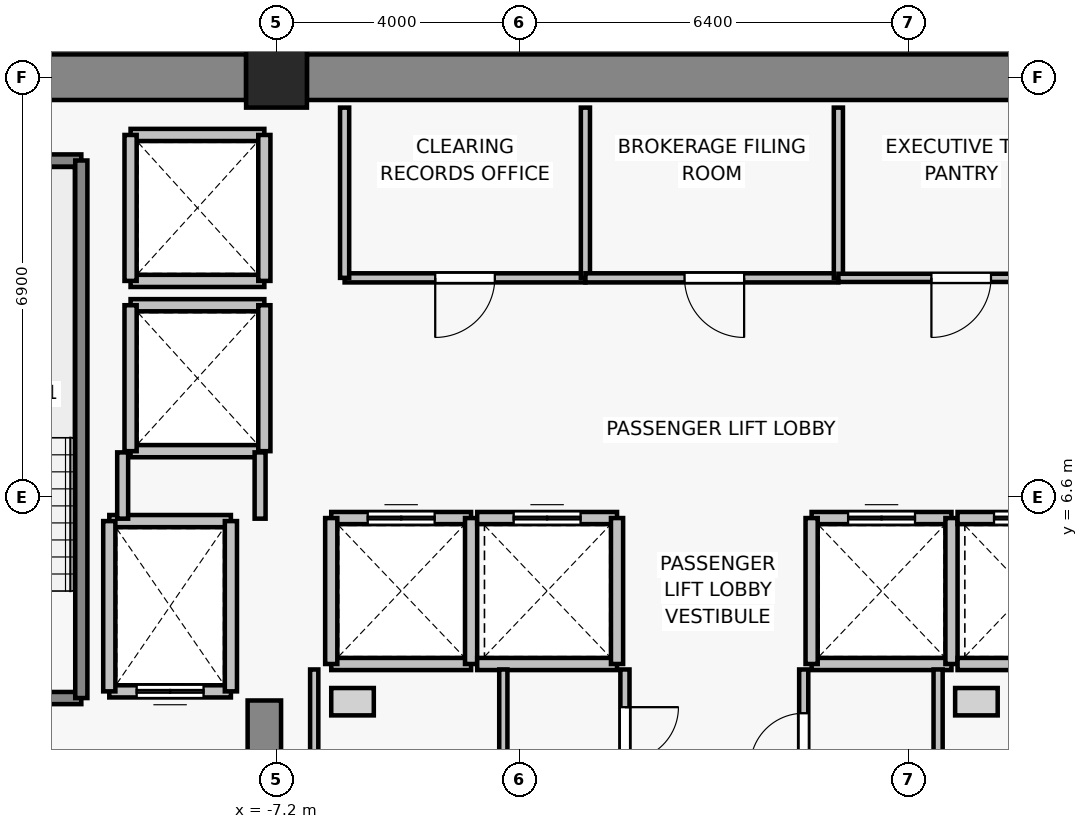
"""IFC4 building model, lengths in metres.
Left out: names, types, materials, properties, quantities, classifications, styles, units other than length and angle.
Written with IfcOpenShell. Run it as: python <this file> out.ifc"""

import sys

from ifc_helpers import new_model, si_unit, direction, frame, frame_2d, origin, origin_2d, place, context, subcontext, project, spatial, rectangle, extrude, source, transform, mapped, element, fill, save


model = new_model("IFC4")
c1 = context("Model", 3, precision=1e-05, world=origin(), true_north=direction((0.0, 1.0)))
c2 = subcontext(c1, "Body", "Model", "MODEL_VIEW")
j1 = project(units=[si_unit("LENGTHUNIT", "METRE"), si_unit("PLANEANGLEUNIT", "RADIAN")], contexts=[c1])
p1 = place(None, origin())
s1 = spatial("IfcSite", under=j1, at=p1, CompositionType="ELEMENT")
p2 = place(p1, origin())
s2 = spatial("IfcBuilding", under=s1, at=p2, CompositionType="ELEMENT")
p3 = place(p2, frame((0.0, 0.0, 195.7)))
s3 = spatial("IfcBuildingStorey", under=s2, at=p3, CompositionType="ELEMENT", Elevation=195.7)
p4 = place(p3, frame((-7.2, 13.5, 0.0), z_axis=(0.0, 0.0, 1.0), x_axis=(1.0, 0.0, 0.0)))
e1 = element("IfcColumn", 1, at=p4, inside=s3, PredefinedType="COLUMN", context=c2, shape_type="SweptSolid", body=[
    extrude(rectangle(XDim=1.0, YDim=1.0, at=origin_2d()), origin(), (0.0, 0.0, 1.0), 3.3),
])
p5 = place(p3, frame((-13.9, 13.5, 0.0), z_axis=(0.0, 0.0, 1.0), x_axis=(1.0, 0.0, 0.0)))
e2 = element("IfcWall", 2, at=p5, inside=s3, PredefinedType="SHEAR", context=c2, shape_type="SweptSolid", body=[
    extrude(rectangle(XDim=6.2, YDim=0.75, at=frame_2d((3.1, 0.0))), origin(), (0.0, 0.0, 1.0), 3.05),
])
p6 = place(p3, frame((-6.7, 13.5, 0.0), z_axis=(0.0, 0.0, 1.0), x_axis=(1.0, 0.0, 0.0)))
e3 = element("IfcWall", 3, at=p6, inside=s3, PredefinedType="SHEAR", context=c2, shape_type="SweptSolid", body=[
    extrude(rectangle(XDim=13.4, YDim=0.75, at=frame_2d((6.7, 0.0))), origin(), (0.0, 0.0, 1.0), 3.05),
])
p7 = place(p3, frame((-7.4, -0.825, 0.0), z_axis=(0.0, 0.0, 1.0), x_axis=(0.0, 1.0, 0.0)))
e4 = element("IfcWall", 4, at=p7, inside=s3, PredefinedType="SHEAR", context=c2, shape_type="SweptSolid", body=[
    extrude(rectangle(XDim=4.075, YDim=0.55, at=frame_2d((2.038, 0.0))), origin(), (0.0, 0.0, 1.0), 3.05),
])
p8 = place(p3, frame((-7.95, 3.4, 0.0), z_axis=(0.0, 0.0, 1.0), x_axis=(-1.0, 0.0, 0.0)))
e5 = element("IfcWall", 5, at=p8, inside=s3, PredefinedType="SOLIDWALL", context=c2, shape_type="SweptSolid", body=[
    extrude(rectangle(XDim=2.0, YDim=0.2, at=frame_2d((1.0, 0.0))), origin(), (0.0, 0.0, 1.0), 3.05),
])
p9 = place(p8, frame((0.45, 0.0, 0.0)))
e6 = element("IfcOpeningElement", 6, at=p9, cuts=e5, PredefinedType="OPENING", context=c2, shape_type="SweptSolid", body=[
    extrude(rectangle(XDim=1.1, YDim=2.2, at=frame_2d((0.55, 1.1))), frame((0.0, 0.11, 0.0), z_axis=(0.0, -1.0, 0.0), x_axis=(1.0, 0.0, 0.0)), (0.0, 0.0, 1.0), 0.22),
])
p10 = place(p3, frame((-9.95, 6.2, 0.0), z_axis=(0.0, 0.0, 1.0), x_axis=(1.0, 0.0, 0.0)))
e7 = element("IfcWall", 7, at=p10, inside=s3, PredefinedType="SOLIDWALL", context=c2, shape_type="SweptSolid", body=[
    extrude(rectangle(XDim=2.0, YDim=0.2, at=frame_2d((1.0, 0.0))), origin(), (0.0, 0.0, 1.0), 3.05),
])
for number, where, z_axis, x_axis in (
    (8, (-9.95, 3.4, 0.0), (0.0, 0.0, 1.0), (0.0, 1.0, 0.0)),
    (9, (-7.95, 6.2, 0.0), (0.0, 0.0, 1.0), (0.0, -1.0, 0.0)),
):
    element("IfcWall", number, at=place(p3, frame(where, z_axis=z_axis, x_axis=x_axis)), inside=s3, PredefinedType="SOLIDWALL", context=c2, shape_type="SweptSolid", body=[
        extrude(rectangle(XDim=2.8, YDim=0.2, at=frame_2d((1.4, 0.0))), origin(), (0.0, 0.0, 1.0), 3.05),
    ])
p11 = place(p3, frame((-4.0, 3.85, 0.0), z_axis=(0.0, 0.0, 1.0), x_axis=(-1.0, 0.0, 0.0)))
e10 = element("IfcWall", 10, at=p11, inside=s3, PredefinedType="SOLIDWALL", context=c2, shape_type="SweptSolid", body=[
    extrude(rectangle(XDim=2.3, YDim=0.2, at=frame_2d((1.15, 0.0))), origin(), (0.0, 0.0, 1.0), 3.05),
])
p12 = place(p3, frame((-6.3, 6.25, 0.0), z_axis=(0.0, 0.0, 1.0), x_axis=(1.0, 0.0, 0.0)))
e11 = element("IfcWall", 11, at=p12, inside=s3, PredefinedType="SOLIDWALL", context=c2, shape_type="SweptSolid", body=[
    extrude(rectangle(XDim=2.3, YDim=0.2, at=frame_2d((1.15, 0.0))), origin(), (0.0, 0.0, 1.0), 3.05),
])
p13 = place(p12, frame((0.6, 0.0, 0.0)))
e12 = element("IfcOpeningElement", 12, at=p13, cuts=e11, PredefinedType="OPENING", context=c2, shape_type="SweptSolid", body=[
    extrude(rectangle(XDim=1.1, YDim=2.2, at=frame_2d((0.55, 1.1))), frame((0.0, 0.11, 0.0), z_axis=(0.0, -1.0, 0.0), x_axis=(1.0, 0.0, 0.0)), (0.0, 0.0, 1.0), 0.22),
])
for number, where, z_axis, x_axis in (
    (13, (-6.3, 3.85, 0.0), (0.0, 0.0, 1.0), (0.0, 1.0, 0.0)),
    (14, (-4.0, 6.25, 0.0), (0.0, 0.0, 1.0), (0.0, -1.0, 0.0)),
):
    element("IfcWall", number, at=place(p3, frame(where, z_axis=z_axis, x_axis=x_axis)), inside=s3, PredefinedType="SOLIDWALL", context=c2, shape_type="SweptSolid", body=[
        extrude(rectangle(XDim=2.4, YDim=0.2, at=frame_2d((1.2, 0.0))), origin(), (0.0, 0.0, 1.0), 3.05),
    ])
p14 = place(p3, frame((-1.6, 3.85, 0.0), z_axis=(0.0, 0.0, 1.0), x_axis=(-1.0, 0.0, 0.0)))
e15 = element("IfcWall", 15, at=p14, inside=s3, PredefinedType="SOLIDWALL", context=c2, shape_type="SweptSolid", body=[
    extrude(rectangle(XDim=2.3, YDim=0.2, at=frame_2d((1.15, 0.0))), origin(), (0.0, 0.0, 1.0), 3.05),
])
p15 = place(p3, frame((-3.9, 6.25, 0.0), z_axis=(0.0, 0.0, 1.0), x_axis=(1.0, 0.0, 0.0)))
e16 = element("IfcWall", 16, at=p15, inside=s3, PredefinedType="SOLIDWALL", context=c2, shape_type="SweptSolid", body=[
    extrude(rectangle(XDim=2.3, YDim=0.2, at=frame_2d((1.15, 0.0))), origin(), (0.0, 0.0, 1.0), 3.05),
])
p16 = place(p15, frame((0.6, 0.0, 0.0)))
e17 = element("IfcOpeningElement", 17, at=p16, cuts=e16, PredefinedType="OPENING", context=c2, shape_type="SweptSolid", body=[
    extrude(rectangle(XDim=1.1, YDim=2.2, at=frame_2d((0.55, 1.1))), frame((0.0, 0.11, 0.0), z_axis=(0.0, -1.0, 0.0), x_axis=(1.0, 0.0, 0.0)), (0.0, 0.0, 1.0), 0.22),
])
p17 = place(p3, frame((-1.6, 6.25, 0.0), z_axis=(0.0, 0.0, 1.0), x_axis=(0.0, -1.0, 0.0)))
e18 = element("IfcWall", 18, at=p17, inside=s3, PredefinedType="SOLIDWALL", context=c2, shape_type="SweptSolid", body=[
    extrude(rectangle(XDim=2.4, YDim=0.2, at=frame_2d((1.2, 0.0))), origin(), (0.0, 0.0, 1.0), 3.05),
])
p18 = place(p3, frame((3.9, 3.85, 0.0), z_axis=(0.0, 0.0, 1.0), x_axis=(-1.0, 0.0, 0.0)))
e19 = element("IfcWall", 19, at=p18, inside=s3, PredefinedType="SOLIDWALL", context=c2, shape_type="SweptSolid", body=[
    extrude(rectangle(XDim=2.3, YDim=0.2, at=frame_2d((1.15, 0.0))), origin(), (0.0, 0.0, 1.0), 3.05),
])
p19 = place(p3, frame((1.6, 6.25, 0.0), z_axis=(0.0, 0.0, 1.0), x_axis=(1.0, 0.0, 0.0)))
e20 = element("IfcWall", 20, at=p19, inside=s3, PredefinedType="SOLIDWALL", context=c2, shape_type="SweptSolid", body=[
    extrude(rectangle(XDim=2.3, YDim=0.2, at=frame_2d((1.15, 0.0))), origin(), (0.0, 0.0, 1.0), 3.05),
])
p20 = place(p19, frame((0.6, 0.0, 0.0)))
e21 = element("IfcOpeningElement", 21, at=p20, cuts=e20, PredefinedType="OPENING", context=c2, shape_type="SweptSolid", body=[
    extrude(rectangle(XDim=1.1, YDim=2.2, at=frame_2d((0.55, 1.1))), frame((0.0, 0.11, 0.0), z_axis=(0.0, -1.0, 0.0), x_axis=(1.0, 0.0, 0.0)), (0.0, 0.0, 1.0), 0.22),
])
for number, where, z_axis, x_axis in (
    (22, (1.6, 3.85, 0.0), (0.0, 0.0, 1.0), (0.0, 1.0, 0.0)),
    (23, (3.9, 6.25, 0.0), (0.0, 0.0, 1.0), (0.0, -1.0, 0.0)),
):
    element("IfcWall", number, at=place(p3, frame(where, z_axis=z_axis, x_axis=x_axis)), inside=s3, PredefinedType="SOLIDWALL", context=c2, shape_type="SweptSolid", body=[
        extrude(rectangle(XDim=2.4, YDim=0.2, at=frame_2d((1.2, 0.0))), origin(), (0.0, 0.0, 1.0), 3.05),
    ])
p21 = place(p3, frame((6.3, 3.85, 0.0), z_axis=(0.0, 0.0, 1.0), x_axis=(-1.0, 0.0, 0.0)))
e24 = element("IfcWall", 24, at=p21, inside=s3, PredefinedType="SOLIDWALL", context=c2, shape_type="SweptSolid", body=[
    extrude(rectangle(XDim=2.3, YDim=0.2, at=frame_2d((1.15, 0.0))), origin(), (0.0, 0.0, 1.0), 3.05),
])
p22 = place(p3, frame((4.0, 6.25, 0.0), z_axis=(0.0, 0.0, 1.0), x_axis=(1.0, 0.0, 0.0)))
e25 = element("IfcWall", 25, at=p22, inside=s3, PredefinedType="SOLIDWALL", context=c2, shape_type="SweptSolid", body=[
    extrude(rectangle(XDim=2.3, YDim=0.2, at=frame_2d((1.15, 0.0))), origin(), (0.0, 0.0, 1.0), 3.05),
])
p23 = place(p22, frame((0.6, 0.0, 0.0)))
e26 = element("IfcOpeningElement", 26, at=p23, cuts=e25, PredefinedType="OPENING", context=c2, shape_type="SweptSolid", body=[
    extrude(rectangle(XDim=1.1, YDim=2.2, at=frame_2d((0.55, 1.1))), frame((0.0, 0.11, 0.0), z_axis=(0.0, -1.0, 0.0), x_axis=(1.0, 0.0, 0.0)), (0.0, 0.0, 1.0), 0.22),
])
for number, where, z_axis, x_axis in (
    (27, (-7.4, 7.35, 0.0), (0.0, 0.0, 1.0), (-1.0, 0.0, 0.0)),
    (28, (-9.6, 9.75, 0.0), (0.0, 0.0, 1.0), (1.0, 0.0, 0.0)),
):
    element("IfcWall", number, at=place(p3, frame(where, z_axis=z_axis, x_axis=x_axis)), inside=s3, PredefinedType="SOLIDWALL", context=c2, shape_type="SweptSolid", body=[
        extrude(rectangle(XDim=2.2, YDim=0.2, at=frame_2d((1.1, 0.0))), origin(), (0.0, 0.0, 1.0), 2.54),
    ])
p24 = place(p3, frame((-9.6, 7.35, 0.0), z_axis=(0.0, 0.0, 1.0), x_axis=(0.0, 1.0, 0.0)))
e29 = element("IfcWall", 29, at=p24, inside=s3, PredefinedType="SOLIDWALL", context=c2, shape_type="SweptSolid", body=[
    extrude(rectangle(XDim=2.4, YDim=0.2, at=frame_2d((1.2, 0.0))), origin(), (0.0, 0.0, 1.0), 3.05),
])
p25 = place(p3, frame((-7.4, 9.75, 0.0), z_axis=(0.0, 0.0, 1.0), x_axis=(0.0, -1.0, 0.0)))
e30 = element("IfcWall", 30, at=p25, inside=s3, PredefinedType="SOLIDWALL", context=c2, shape_type="SweptSolid", body=[
    extrude(rectangle(XDim=2.4, YDim=0.2, at=frame_2d((1.2, 0.0))), origin(), (0.0, 0.0, 1.0), 2.54),
])
for number, where, z_axis, x_axis in (
    (31, (-7.4, 10.15, 0.0), (0.0, 0.0, 1.0), (-1.0, 0.0, 0.0)),
    (32, (-9.6, 12.55, 0.0), (0.0, 0.0, 1.0), (1.0, 0.0, 0.0)),
):
    element("IfcWall", number, at=place(p3, frame(where, z_axis=z_axis, x_axis=x_axis)), inside=s3, PredefinedType="SOLIDWALL", context=c2, shape_type="SweptSolid", body=[
        extrude(rectangle(XDim=2.2, YDim=0.2, at=frame_2d((1.1, 0.0))), origin(), (0.0, 0.0, 1.0), 2.54),
    ])
p26 = place(p3, frame((-9.6, 10.15, 0.0), z_axis=(0.0, 0.0, 1.0), x_axis=(0.0, 1.0, 0.0)))
e33 = element("IfcWall", 33, at=p26, inside=s3, PredefinedType="SOLIDWALL", context=c2, shape_type="SweptSolid", body=[
    extrude(rectangle(XDim=2.4, YDim=0.2, at=frame_2d((1.2, 0.0))), origin(), (0.0, 0.0, 1.0), 3.05),
])
p27 = place(p3, frame((-7.4, 12.55, 0.0), z_axis=(0.0, 0.0, 1.0), x_axis=(0.0, -1.0, 0.0)))
e34 = element("IfcWall", 34, at=p27, inside=s3, PredefinedType="SOLIDWALL", context=c2, shape_type="SweptSolid", body=[
    extrude(rectangle(XDim=2.4, YDim=0.2, at=frame_2d((1.2, 0.0))), origin(), (0.0, 0.0, 1.0), 2.54),
])
p28 = place(p3, frame((-10.41, 3.29, 0.0), z_axis=(0.0, 0.0, 1.0), x_axis=(-1.0, 0.0, 0.0)))
e35 = element("IfcWall", 35, at=p28, inside=s3, PredefinedType="SOLIDWALL", context=c2, shape_type="SweptSolid", body=[
    extrude(rectangle(XDim=3.52, YDim=0.2, at=frame_2d((1.76, 0.0))), origin(), (0.0, 0.0, 1.0), 3.05),
])
p29 = place(p28, frame((1.165, 0.0, 0.0)))
e36 = element("IfcOpeningElement", 36, at=p29, cuts=e35, PredefinedType="OPENING", context=c2, shape_type="SweptSolid", body=[
    extrude(rectangle(XDim=1.15, YDim=2.15, at=frame_2d((0.575, 1.075))), frame((0.0, 0.11, 0.0), z_axis=(0.0, -1.0, 0.0), x_axis=(1.0, 0.0, 0.0)), (0.0, 0.0, 1.0), 0.22),
])
p30 = place(p3, frame((-13.93, 12.13, 0.0), z_axis=(0.0, 0.0, 1.0), x_axis=(1.0, 0.0, 0.0)))
e37 = element("IfcWall", 37, at=p30, inside=s3, PredefinedType="SOLIDWALL", context=c2, shape_type="SweptSolid", body=[
    extrude(rectangle(XDim=3.52, YDim=0.2, at=frame_2d((1.76, 0.0))), origin(), (0.0, 0.0, 1.0), 3.05),
])
p31 = place(p3, frame((-10.41, 12.13, 0.0), z_axis=(0.0, 0.0, 1.0), x_axis=(0.0, -1.0, 0.0)))
e38 = element("IfcWall", 38, at=p31, inside=s3, PredefinedType="SOLIDWALL", context=c2, shape_type="SweptSolid", body=[
    extrude(rectangle(XDim=8.84, YDim=0.2, at=frame_2d((4.42, 0.0))), origin(), (0.0, 0.0, 1.0), 3.05),
])
p32 = place(p3, frame((-9.73, 6.24, 0.0), z_axis=(0.0, 0.0, 1.0), x_axis=(0.0, 1.0, 0.0)))
e39 = element("IfcWall", 39, at=p32, inside=s3, PredefinedType="PARTITIONING", context=c2, shape_type="SweptSolid", body=[
    extrude(rectangle(XDim=1.09, YDim=0.18, at=frame_2d((0.545, 0.0))), origin(), (0.0, 0.0, 1.0), 3.05),
])
p33 = place(p3, frame((-7.47, 7.33, 0.0), z_axis=(0.0, 0.0, 1.0), x_axis=(0.0, -1.0, 0.0)))
e40 = element("IfcWall", 40, at=p33, inside=s3, PredefinedType="PARTITIONING", context=c2, shape_type="SweptSolid", body=[
    extrude(rectangle(XDim=1.09, YDim=0.18, at=frame_2d((0.545, 0.0))), origin(), (0.0, 0.0, 1.0), 2.54),
])
p34 = place(p3, frame((-2.12, 10.2, 0.0), z_axis=(0.0, 0.0, 1.0), x_axis=(-1.0, 0.0, 0.0)))
e41 = element("IfcWall", 41, at=p34, inside=s3, PredefinedType="PARTITIONING", context=c2, shape_type="SweptSolid", body=[
    extrude(rectangle(XDim=3.96, YDim=0.15, at=frame_2d((1.98, 0.0))), origin(), (0.0, 0.0, 1.0), 3.05),
])
p35 = place(p34, frame((1.49, 0.0, 0.0)))
e42 = element("IfcOpeningElement", 42, at=p35, cuts=e41, PredefinedType="OPENING", context=c2, shape_type="SweptSolid", body=[
    extrude(rectangle(XDim=0.98, YDim=2.15, at=frame_2d((0.49, 1.075))), frame((0.0, 0.085, 0.0), z_axis=(0.0, -1.0, 0.0), x_axis=(1.0, 0.0, 0.0)), (0.0, 0.0, 1.0), 0.17),
])
for number, where, z_axis, x_axis in (
    (43, (-6.08, 10.2, 0.0), (0.0, 0.0, 1.0), (0.0, 1.0, 0.0)),
    (44, (-2.12, 13.0, 0.0), (0.0, 0.0, 1.0), (0.0, -1.0, 0.0)),
):
    element("IfcWall", number, at=place(p3, frame(where, z_axis=z_axis, x_axis=x_axis)), inside=s3, PredefinedType="PARTITIONING", context=c2, shape_type="SweptSolid", body=[
        extrude(rectangle(XDim=2.8, YDim=0.15, at=frame_2d((1.4, 0.0))), origin(), (0.0, 0.0, 1.0), 3.05),
    ])
p36 = place(p3, frame((2.04, 10.2, 0.0), z_axis=(0.0, 0.0, 1.0), x_axis=(-1.0, 0.0, 0.0)))
e45 = element("IfcWall", 45, at=p36, inside=s3, PredefinedType="PARTITIONING", context=c2, shape_type="SweptSolid", body=[
    extrude(rectangle(XDim=4.16, YDim=0.15, at=frame_2d((2.08, 0.0))), origin(), (0.0, 0.0, 1.0), 3.05),
])
p37 = place(p36, frame((1.55, 0.0, 0.0)))
e46 = element("IfcOpeningElement", 46, at=p37, cuts=e45, PredefinedType="OPENING", context=c2, shape_type="SweptSolid", body=[
    extrude(rectangle(XDim=0.98, YDim=2.15, at=frame_2d((0.49, 1.075))), frame((0.0, 0.085, 0.0), z_axis=(0.0, -1.0, 0.0), x_axis=(1.0, 0.0, 0.0)), (0.0, 0.0, 1.0), 0.17),
])
p38 = place(p3, frame((2.04, 13.0, 0.0), z_axis=(0.0, 0.0, 1.0), x_axis=(0.0, -1.0, 0.0)))
e47 = element("IfcWall", 47, at=p38, inside=s3, PredefinedType="PARTITIONING", context=c2, shape_type="SweptSolid", body=[
    extrude(rectangle(XDim=2.8, YDim=0.15, at=frame_2d((1.4, 0.0))), origin(), (0.0, 0.0, 1.0), 3.05),
])
p39 = place(p3, frame((6.08, 10.2, 0.0), z_axis=(0.0, 0.0, 1.0), x_axis=(-1.0, 0.0, 0.0)))
e48 = element("IfcWall", 48, at=p39, inside=s3, PredefinedType="PARTITIONING", context=c2, shape_type="SweptSolid", body=[
    extrude(rectangle(XDim=4.04, YDim=0.135, at=frame_2d((2.02, 0.0))), origin(), (0.0, 0.0, 1.0), 3.05),
])
p40 = place(p39, frame((1.53, 0.0, 0.0)))
e49 = element("IfcOpeningElement", 49, at=p40, cuts=e48, PredefinedType="OPENING", context=c2, shape_type="SweptSolid", body=[
    extrude(rectangle(XDim=0.98, YDim=2.15, at=frame_2d((0.49, 1.075))), frame((0.0, 0.077, 0.0), z_axis=(0.0, -1.0, 0.0), x_axis=(1.0, 0.0, 0.0)), (0.0, 0.0, 1.0), 0.155),
])
for number, where, z_axis, x_axis in (
    (50, (-6.58, -0.73, 0.0), (0.0, 0.0, 1.0), (0.0, 1.0, 0.0)),
    (51, (-3.47, 3.76, 0.0), (0.0, 0.0, 1.0), (0.0, -1.0, 0.0)),
):
    element("IfcWall", number, at=place(p3, frame(where, z_axis=z_axis, x_axis=x_axis)), inside=s3, PredefinedType="PARTITIONING", context=c2, shape_type="SweptSolid", body=[
        extrude(rectangle(XDim=4.49, YDim=0.135, at=frame_2d((2.245, 0.0))), origin(), (0.0, 0.0, 1.0), 3.05),
    ])
p41 = place(p3, frame((-1.47, 3.76, 0.0), z_axis=(0.0, 0.0, 1.0), x_axis=(0.0, -1.0, 0.0)))
e52 = element("IfcWall", 52, at=p41, inside=s3, PredefinedType="PARTITIONING", context=c2, shape_type="SweptSolid", body=[
    extrude(rectangle(XDim=2.13, YDim=0.15, at=frame_2d((1.065, 0.0))), origin(), (0.0, 0.0, 1.0), 3.05),
])
p42 = place(p41, frame((0.62, 0.0, 0.0)))
e53 = element("IfcOpeningElement", 53, at=p42, cuts=e52, PredefinedType="OPENING", context=c2, shape_type="SweptSolid", body=[
    extrude(rectangle(XDim=0.88, YDim=2.1, at=frame_2d((0.44, 1.05))), frame((0.0, 0.085, 0.0), z_axis=(0.0, -1.0, 0.0), x_axis=(1.0, 0.0, 0.0)), (0.0, 0.0, 1.0), 0.17),
])
p43 = place(p3, frame((1.47, 1.43, 0.0), z_axis=(0.0, 0.0, 1.0), x_axis=(0.0, 1.0, 0.0)))
e54 = element("IfcWall", 54, at=p43, inside=s3, PredefinedType="PARTITIONING", context=c2, shape_type="SweptSolid", body=[
    extrude(rectangle(XDim=2.33, YDim=0.15, at=frame_2d((1.165, 0.0))), origin(), (0.0, 0.0, 1.0), 3.05),
])
p44 = place(p43, frame((0.73, 0.0, 0.0)))
e55 = element("IfcOpeningElement", 55, at=p44, cuts=e54, PredefinedType="OPENING", context=c2, shape_type="SweptSolid", body=[
    extrude(rectangle(XDim=0.88, YDim=2.15, at=frame_2d((0.44, 1.075))), frame((0.0, 0.085, 0.0), z_axis=(0.0, -1.0, 0.0), x_axis=(1.0, 0.0, 0.0)), (0.0, 0.0, 1.0), 0.17),
])
p45 = place(p3, frame((3.68, 3.76, 0.0), z_axis=(0.0, 0.0, 1.0), x_axis=(0.0, -1.0, 0.0)))
e56 = element("IfcWall", 56, at=p45, inside=s3, PredefinedType="PARTITIONING", context=c2, shape_type="SweptSolid", body=[
    extrude(rectangle(XDim=2.33, YDim=0.15, at=frame_2d((1.165, 0.0))), origin(), (0.0, 0.0, 1.0), 3.05),
])
m1 = source(origin(), c2, "Body", "SweptSolid", [
    extrude(rectangle(XDim=1.1, YDim=2.2, at=frame_2d((0.55, 1.1))), frame((0.0, 0.025, 0.0), z_axis=(0.0, -1.0, 0.0), x_axis=(1.0, 0.0, 0.0)), (0.0, 0.0, 1.0), 0.05),
])
p46 = place(p9, origin())
e57 = element("IfcDoor", 57, at=p46, inside=s3, OperationType="DOUBLE_DOOR_SLIDING", PredefinedType="DOOR", context=c2, shape_type="MappedRepresentation", body=[
    mapped(m1, transform((0.0, 0.0, 0.0), x_axis=(1.0, 0.0, 0.0), y_axis=(0.0, 1.0, 0.0), z_axis=(0.0, 0.0, 1.0), scale=1.0)),
])
fill(e6, e57)
p47 = place(p13, origin())
e58 = element("IfcDoor", 58, at=p47, inside=s3, OperationType="DOUBLE_DOOR_SLIDING", PredefinedType="DOOR", context=c2, shape_type="MappedRepresentation", body=[
    mapped(m1, transform((0.0, 0.0, 0.0), x_axis=(1.0, 0.0, 0.0), y_axis=(0.0, 1.0, 0.0), z_axis=(0.0, 0.0, 1.0), scale=1.0)),
])
fill(e12, e58)
p48 = place(p16, origin())
e59 = element("IfcDoor", 59, at=p48, inside=s3, OperationType="DOUBLE_DOOR_SLIDING", PredefinedType="DOOR", context=c2, shape_type="MappedRepresentation", body=[
    mapped(m1, transform((0.0, 0.0, 0.0), x_axis=(1.0, 0.0, 0.0), y_axis=(0.0, 1.0, 0.0), z_axis=(0.0, 0.0, 1.0), scale=1.0)),
])
fill(e17, e59)
p49 = place(p20, origin())
e60 = element("IfcDoor", 60, at=p49, inside=s3, OperationType="DOUBLE_DOOR_SLIDING", PredefinedType="DOOR", context=c2, shape_type="MappedRepresentation", body=[
    mapped(m1, transform((0.0, 0.0, 0.0), x_axis=(1.0, 0.0, 0.0), y_axis=(0.0, 1.0, 0.0), z_axis=(0.0, 0.0, 1.0), scale=1.0)),
])
fill(e21, e60)
p50 = place(p23, origin())
e61 = element("IfcDoor", 61, at=p50, inside=s3, OperationType="DOUBLE_DOOR_SLIDING", PredefinedType="DOOR", context=c2, shape_type="MappedRepresentation", body=[
    mapped(m1, transform((0.0, 0.0, 0.0), x_axis=(1.0, 0.0, 0.0), y_axis=(0.0, 1.0, 0.0), z_axis=(0.0, 0.0, 1.0), scale=1.0)),
])
fill(e26, e61)
m2 = source(origin(), c2, "Body", "SweptSolid", [
    extrude(rectangle(XDim=0.98, YDim=2.15, at=frame_2d((0.49, 1.075))), frame((0.0, 0.025, 0.0), z_axis=(0.0, -1.0, 0.0), x_axis=(1.0, 0.0, 0.0)), (0.0, 0.0, 1.0), 0.05),
])
p51 = place(p35, origin())
e62 = element("IfcDoor", 62, at=p51, inside=s3, OperationType="SINGLE_SWING_RIGHT", PredefinedType="DOOR", context=c2, shape_type="MappedRepresentation", body=[
    mapped(m2, transform((0.0, 0.0, 0.0), x_axis=(1.0, 0.0, 0.0), y_axis=(0.0, 1.0, 0.0), z_axis=(0.0, 0.0, 1.0), scale=1.0)),
])
fill(e42, e62)
p52 = place(p37, origin())
e63 = element("IfcDoor", 63, at=p52, inside=s3, OperationType="SINGLE_SWING_LEFT", PredefinedType="DOOR", context=c2, shape_type="MappedRepresentation", body=[
    mapped(m2, transform((0.0, 0.0, 0.0), x_axis=(1.0, 0.0, 0.0), y_axis=(0.0, 1.0, 0.0), z_axis=(0.0, 0.0, 1.0), scale=1.0)),
])
fill(e46, e63)
p53 = place(p40, origin())
e64 = element("IfcDoor", 64, at=p53, inside=s3, OperationType="SINGLE_SWING_RIGHT", PredefinedType="DOOR", context=c2, shape_type="MappedRepresentation", body=[
    mapped(m2, transform((0.0, 0.0, 0.0), x_axis=(1.0, 0.0, 0.0), y_axis=(0.0, 1.0, 0.0), z_axis=(0.0, 0.0, 1.0), scale=1.0)),
])
fill(e49, e64)
m3 = source(origin(), c2, "Body", "SweptSolid", [
    extrude(rectangle(XDim=0.88, YDim=2.1, at=frame_2d((0.44, 1.05))), frame((0.0, 0.025, 0.0), z_axis=(0.0, -1.0, 0.0), x_axis=(1.0, 0.0, 0.0)), (0.0, 0.0, 1.0), 0.05),
])
p54 = place(p42, origin())
e65 = element("IfcDoor", 65, at=p54, inside=s3, OperationType="SINGLE_SWING_LEFT", PredefinedType="DOOR", context=c2, shape_type="MappedRepresentation", body=[
    mapped(m3, transform((0.0, 0.0, 0.0), x_axis=(1.0, 0.0, 0.0), y_axis=(0.0, 1.0, 0.0), z_axis=(0.0, 0.0, 1.0), scale=1.0)),
])
fill(e53, e65)
m4 = source(origin(), c2, "Body", "SweptSolid", [
    extrude(rectangle(XDim=0.88, YDim=2.15, at=frame_2d((0.44, 1.075))), frame((0.0, 0.025, 0.0), z_axis=(0.0, -1.0, 0.0), x_axis=(1.0, 0.0, 0.0)), (0.0, 0.0, 1.0), 0.05),
])
p55 = place(p44, origin())
e66 = element("IfcDoor", 66, at=p55, inside=s3, OperationType="SINGLE_SWING_LEFT", PredefinedType="DOOR", context=c2, shape_type="MappedRepresentation", body=[
    mapped(m4, transform((0.0, 0.0, 0.0), x_axis=(1.0, 0.0, 0.0), y_axis=(0.0, 1.0, 0.0), z_axis=(0.0, 0.0, 1.0), scale=1.0)),
])
fill(e55, e66)
save(model, sys.argv[1])
